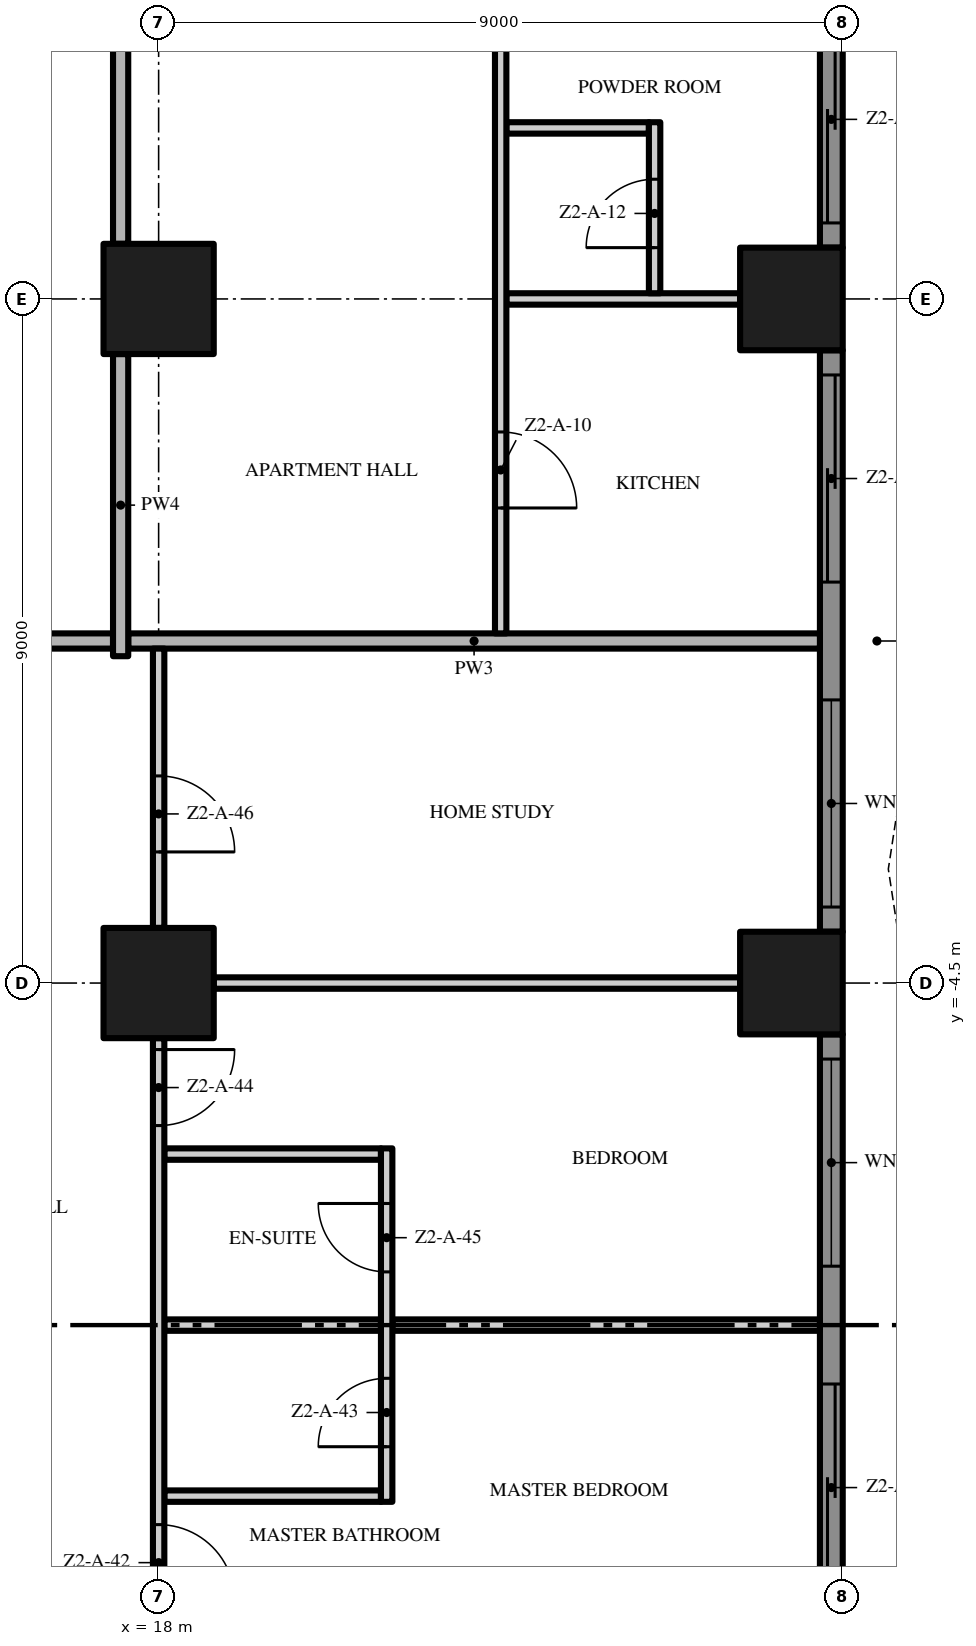
"""IFC4 building model, lengths in metres.
Left out: names, types, materials, properties, quantities, classifications, styles, units other than length and angle.
Written with IfcOpenShell. Run it as: python <this file> out.ifc"""

import sys

from ifc_helpers import new_model, si_unit, direction, frame, frame_2d, origin, origin_2d, place, context, subcontext, project, spatial, polyline, rectangle, outline, extrude, element, fill, save


model = new_model("IFC4")
c1 = context("Model", 3, precision=1e-05, world=origin(), true_north=direction((0.0, 1.0)))
c2 = subcontext(c1, "Body", "Model", "MODEL_VIEW")
j1 = project(units=[si_unit("LENGTHUNIT", "METRE"), si_unit("PLANEANGLEUNIT", "RADIAN")], contexts=[c1])
p1 = place(None, origin())
s1 = spatial("IfcSite", under=j1, at=p1, CompositionType="ELEMENT")
p2 = place(p1, origin())
s2 = spatial("IfcBuilding", under=s1, at=p2, CompositionType="ELEMENT")
p3 = place(p2, frame((0.0, 0.0, 69.4)))
s3 = spatial("IfcBuildingStorey", under=s2, at=p3, CompositionType="ELEMENT", Elevation=69.4)
for number, where, z_axis, x_axis in (
    (1, (18.0, -4.5, 0.0), (0.0, 0.0, 1.0), (1.0, 0.0, 0.0)),
    (2, (18.0, 4.5, 0.0), (0.0, 0.0, 1.0), (1.0, 0.0, 0.0)),
):
    element("IfcColumn", number, at=place(p3, frame(where, z_axis=z_axis, x_axis=x_axis)), inside=s3, PredefinedType="COLUMN", context=c2, shape_type="SweptSolid", body=[
        extrude(rectangle(XDim=1.45, YDim=1.45, at=origin_2d()), origin(), (0.0, 0.0, 1.0), 3.5),
    ])
for number, where, z_axis, x_axis in (
    (3, (26.325, -4.5, 0.0), (0.0, 0.0, 1.0), (1.0, 0.0, 0.0)),
    (4, (26.325, 4.5, 0.0), (0.0, 0.0, 1.0), (1.0, 0.0, 0.0)),
):
    element("IfcColumn", number, at=place(p3, frame(where, z_axis=z_axis, x_axis=x_axis)), inside=s3, PredefinedType="COLUMN", context=c2, shape_type="SweptSolid", body=[
        extrude(rectangle(XDim=1.35, YDim=1.35, at=origin_2d()), origin(), (0.0, 0.0, 1.0), 3.5),
    ])
p4 = place(p3, frame((26.85, -5.175, 0.0), z_axis=(0.0, 0.0, 1.0), x_axis=(0.0, -1.0, 0.0)))
e5 = element("IfcWall", 5, at=p4, inside=s3, PredefinedType="SOLIDWALL", context=c2, shape_type="SweptSolid", body=[
    extrude(rectangle(XDim=7.65, YDim=0.3, at=frame_2d((3.825, 0.0))), origin(), (0.0, 0.0, 1.0), 3.5),
])
p5 = place(p4, frame((4.6, 0.0, 0.0)))
e6 = element("IfcOpeningElement", 6, at=p5, cuts=e5, PredefinedType="OPENING", context=c2, shape_type="SweptSolid", body=[
    extrude(rectangle(XDim=2.725, YDim=2.4, at=frame_2d((1.363, 1.2))), frame((0.0, 0.16, 0.0), z_axis=(0.0, -1.0, 0.0), x_axis=(1.0, 0.0, 0.0)), (0.0, 0.0, 1.0), 0.32),
])
p6 = place(p4, frame((0.325, 0.0, 0.45)))
e7 = element("IfcOpeningElement", 7, at=p6, cuts=e5, PredefinedType="OPENING", context=c2, shape_type="SweptSolid", body=[
    extrude(rectangle(XDim=2.725, YDim=2.65, at=frame_2d((1.363, 1.325))), frame((0.0, 0.16, 0.0), z_axis=(0.0, -1.0, 0.0), x_axis=(1.0, 0.0, 0.0)), (0.0, 0.0, 1.0), 0.32),
])
p7 = place(p3, frame((26.85, 3.825, 0.0), z_axis=(0.0, 0.0, 1.0), x_axis=(0.0, -1.0, 0.0)))
e8 = element("IfcWall", 8, at=p7, inside=s3, PredefinedType="SOLIDWALL", context=c2, shape_type="SweptSolid", body=[
    extrude(rectangle(XDim=7.65, YDim=0.3, at=frame_2d((3.825, 0.0))), origin(), (0.0, 0.0, 1.0), 3.5),
])
p8 = place(p7, frame((4.6, 0.0, 0.45)))
e9 = element("IfcOpeningElement", 9, at=p8, cuts=e8, PredefinedType="OPENING", context=c2, shape_type="SweptSolid", body=[
    extrude(rectangle(XDim=2.725, YDim=2.65, at=frame_2d((1.363, 1.325))), frame((0.0, 0.16, 0.0), z_axis=(0.0, -1.0, 0.0), x_axis=(1.0, 0.0, 0.0)), (0.0, 0.0, 1.0), 0.32),
])
p9 = place(p7, frame((0.325, 0.0, 0.0)))
e10 = element("IfcOpeningElement", 10, at=p9, cuts=e8, PredefinedType="OPENING", context=c2, shape_type="SweptSolid", body=[
    extrude(rectangle(XDim=2.725, YDim=2.4, at=frame_2d((1.363, 1.2))), frame((0.0, 0.16, 0.0), z_axis=(0.0, -1.0, 0.0), x_axis=(1.0, 0.0, 0.0)), (0.0, 0.0, 1.0), 0.32),
])
p10 = place(p3, frame((26.85, 12.825, 0.0), z_axis=(0.0, 0.0, 1.0), x_axis=(0.0, -1.0, 0.0)))
e11 = element("IfcWall", 11, at=p10, inside=s3, PredefinedType="SOLIDWALL", context=c2, shape_type="SweptSolid", body=[
    extrude(rectangle(XDim=7.65, YDim=0.3, at=frame_2d((3.825, 0.0))), origin(), (0.0, 0.0, 1.0), 3.5),
])
p11 = place(p10, frame((4.6, 0.0, 0.0)))
e12 = element("IfcOpeningElement", 12, at=p11, cuts=e11, PredefinedType="OPENING", context=c2, shape_type="SweptSolid", body=[
    extrude(rectangle(XDim=2.725, YDim=2.4, at=frame_2d((1.363, 1.2))), frame((0.0, 0.16, 0.0), z_axis=(0.0, -1.0, 0.0), x_axis=(1.0, 0.0, 0.0)), (0.0, 0.0, 1.0), 0.32),
])
p12 = place(p10, frame((0.325, 0.0, 0.45)))
e13 = element("IfcOpeningElement", 13, at=p12, cuts=e11, PredefinedType="OPENING", context=c2, shape_type="SweptSolid", body=[
    extrude(rectangle(XDim=2.725, YDim=2.65, at=frame_2d((1.363, 1.325))), frame((0.0, 0.16, 0.0), z_axis=(0.0, -1.0, 0.0), x_axis=(1.0, 0.0, 0.0)), (0.0, 0.0, 1.0), 0.32),
])
p13 = place(p3, origin())
e14 = element("IfcWall", 14, at=p13, inside=s3, PredefinedType="USERDEFINED", context=c2, shape_type="SweptSolid", body=[
    extrude(outline(polyline([(27.6, -18.0), (27.829, -16.5), (28.429, -15.0), (29.171, -13.5), (29.771, -12.0), (30.0, -10.5), (29.771, -9.0), (29.171, -7.5), (28.429, -6.0), (27.829, -4.5), (27.6, -3.0), (27.829, -1.5), (28.429, 0.0), (29.171, 1.5), (29.771, 3.0), (30.0, 4.5), (29.771, 6.0), (29.171, 7.5), (28.429, 9.0), (27.829, 10.5), (27.6, 12.0), (27.829, 13.5), (28.429, 15.0), (29.171, 16.5), (29.771, 18.0), (29.539, 18.093), (28.942, 16.602), (28.201, 15.102), (27.586, 13.566), (27.347, 12.0), (27.586, 10.434), (28.201, 8.898), (28.942, 7.398), (29.528, 5.934), (29.747, 4.5), (29.528, 3.066), (28.942, 1.602), (28.201, 0.102), (27.586, -1.434), (27.347, -3.0), (27.586, -4.566), (28.201, -6.102), (28.942, -7.602), (29.528, -9.066), (29.747, -10.5), (29.528, -11.934), (28.942, -13.398), (28.201, -14.898), (27.586, -16.434), (27.353, -17.962), (27.6, -18.0)])), origin(), (0.0, 0.0, 1.0), 0.9),
])
for number, where, z_axis, x_axis in (
    (15, (18.075, -11.25, 0.0), (0.0, 0.0, 1.0), (1.0, 0.0, 0.0)),
    (16, (18.075, -9.0, 0.0), (0.0, 0.0, 1.0), (1.0, 0.0, 0.0)),
):
    element("IfcWall", number, at=place(p3, frame(where, z_axis=z_axis, x_axis=x_axis)), inside=s3, PredefinedType="PARTITIONING", context=c2, shape_type="SweptSolid", body=[
        extrude(rectangle(XDim=2.85, YDim=0.15, at=frame_2d((1.425, 0.0))), origin(), (0.0, 0.0, 1.0), 3.5),
    ])
p14 = place(p3, frame((21.075, -9.0, 0.0), z_axis=(0.0, 0.0, 1.0), x_axis=(1.0, 0.0, 0.0)))
e17 = element("IfcWall", 17, at=p14, inside=s3, PredefinedType="PARTITIONING", context=c2, shape_type="SweptSolid", body=[
    extrude(rectangle(XDim=5.625, YDim=0.15, at=frame_2d((2.812, 0.0))), origin(), (0.0, 0.0, 1.0), 3.5),
])
p15 = place(p3, frame((18.075, -6.75, 0.0), z_axis=(0.0, 0.0, 1.0), x_axis=(1.0, 0.0, 0.0)))
e18 = element("IfcWall", 18, at=p15, inside=s3, PredefinedType="PARTITIONING", context=c2, shape_type="SweptSolid", body=[
    extrude(rectangle(XDim=2.85, YDim=0.15, at=frame_2d((1.425, 0.0))), origin(), (0.0, 0.0, 1.0), 3.5),
])
p16 = place(p3, frame((18.725, -4.5, 0.0), z_axis=(0.0, 0.0, 1.0), x_axis=(1.0, 0.0, 0.0)))
e19 = element("IfcWall", 19, at=p16, inside=s3, PredefinedType="PARTITIONING", context=c2, shape_type="SweptSolid", body=[
    extrude(rectangle(XDim=6.925, YDim=0.15, at=frame_2d((3.462, 0.0))), origin(), (0.0, 0.0, 1.0), 3.5),
])
p17 = place(p3, frame((4.6, 0.0, 0.0), z_axis=(0.0, 0.0, 1.0), x_axis=(1.0, 0.0, 0.0)))
e20 = element("IfcWall", 20, at=p17, inside=s3, PredefinedType="PARTITIONING", context=c2, shape_type="SweptSolid", body=[
    extrude(rectangle(XDim=12.8, YDim=0.2, at=frame_2d((6.4, 0.0))), origin(), (0.0, 0.0, 1.0), 3.5),
])
p18 = place(p3, frame((17.6, 0.0, 0.0), z_axis=(0.0, 0.0, 1.0), x_axis=(1.0, 0.0, 0.0)))
e21 = element("IfcWall", 21, at=p18, inside=s3, PredefinedType="PARTITIONING", context=c2, shape_type="SweptSolid", body=[
    extrude(rectangle(XDim=9.1, YDim=0.2, at=frame_2d((4.55, 0.0))), origin(), (0.0, 0.0, 1.0), 3.5),
])
p19 = place(p3, frame((22.575, 4.5, 0.0), z_axis=(0.0, 0.0, 1.0), x_axis=(1.0, 0.0, 0.0)))
e22 = element("IfcWall", 22, at=p19, inside=s3, PredefinedType="PARTITIONING", context=c2, shape_type="SweptSolid", body=[
    extrude(rectangle(XDim=3.075, YDim=0.15, at=frame_2d((1.538, 0.0))), origin(), (0.0, 0.0, 1.0), 3.5),
])
p20 = place(p3, frame((22.575, 6.75, 0.0), z_axis=(0.0, 0.0, 1.0), x_axis=(1.0, 0.0, 0.0)))
e23 = element("IfcWall", 23, at=p20, inside=s3, PredefinedType="PARTITIONING", context=c2, shape_type="SweptSolid", body=[
    extrude(rectangle(XDim=1.875, YDim=0.15, at=frame_2d((0.938, 0.0))), origin(), (0.0, 0.0, 1.0), 3.5),
])
p21 = place(p3, frame((17.5, -0.2, 0.0), z_axis=(0.0, 0.0, 1.0), x_axis=(0.0, 1.0, 0.0)))
e24 = element("IfcWall", 24, at=p21, inside=s3, PredefinedType="PARTITIONING", context=c2, shape_type="SweptSolid", body=[
    extrude(rectangle(XDim=3.975, YDim=0.2, at=frame_2d((1.988, 0.0))), origin(), (0.0, 0.0, 1.0), 3.5),
])
p22 = place(p3, frame((17.5, 12.775, 0.0), z_axis=(0.0, 0.0, 1.0), x_axis=(0.0, -1.0, 0.0)))
e25 = element("IfcWall", 25, at=p22, inside=s3, PredefinedType="PARTITIONING", context=c2, shape_type="SweptSolid", body=[
    extrude(rectangle(XDim=7.55, YDim=0.2, at=frame_2d((3.775, 0.0))), origin(), (0.0, 0.0, 1.0), 3.5),
])
p23 = place(p22, frame((3.175, 0.0, 0.0)))
e26 = element("IfcOpeningElement", 26, at=p23, cuts=e25, PredefinedType="OPENING", context=c2, shape_type="SweptSolid", body=[
    extrude(rectangle(XDim=1.2, YDim=2.4, at=frame_2d((0.6, 1.2))), frame((0.0, 0.11, 0.0), z_axis=(0.0, -1.0, 0.0), x_axis=(1.0, 0.0, 0.0)), (0.0, 0.0, 1.0), 0.22),
])
p24 = place(p3, frame((18.0, -5.225, 0.0), z_axis=(0.0, 0.0, 1.0), x_axis=(0.0, -1.0, 0.0)))
e27 = element("IfcWall", 27, at=p24, inside=s3, PredefinedType="PARTITIONING", context=c2, shape_type="SweptSolid", body=[
    extrude(rectangle(XDim=7.55, YDim=0.15, at=frame_2d((3.775, 0.0))), origin(), (0.0, 0.0, 1.0), 3.5),
])
p25 = place(p24, frame((6.4, 0.0, 0.0)))
e28 = element("IfcOpeningElement", 28, at=p25, cuts=e27, PredefinedType="OPENING", context=c2, shape_type="SweptSolid", body=[
    extrude(rectangle(XDim=1.0, YDim=2.4, at=frame_2d((0.5, 1.2))), frame((0.0, 0.085, 0.0), z_axis=(0.0, -1.0, 0.0), x_axis=(1.0, 0.0, 0.0)), (0.0, 0.0, 1.0), 0.17),
])
p26 = place(p24, frame((0.15, 0.0, 0.0)))
e29 = element("IfcOpeningElement", 29, at=p26, cuts=e27, PredefinedType="OPENING", context=c2, shape_type="SweptSolid", body=[
    extrude(rectangle(XDim=1.0, YDim=2.4, at=frame_2d((0.5, 1.2))), frame((0.0, 0.085, 0.0), z_axis=(0.0, -1.0, 0.0), x_axis=(1.0, 0.0, 0.0)), (0.0, 0.0, 1.0), 0.17),
])
p27 = place(p3, frame((18.0, -0.1, 0.0), z_axis=(0.0, 0.0, 1.0), x_axis=(0.0, -1.0, 0.0)))
e30 = element("IfcWall", 30, at=p27, inside=s3, PredefinedType="PARTITIONING", context=c2, shape_type="SweptSolid", body=[
    extrude(rectangle(XDim=3.675, YDim=0.15, at=frame_2d((1.837, 0.0))), origin(), (0.0, 0.0, 1.0), 3.5),
])
p28 = place(p27, frame((1.675, 0.0, 0.0)))
e31 = element("IfcOpeningElement", 31, at=p28, cuts=e30, PredefinedType="OPENING", context=c2, shape_type="SweptSolid", body=[
    extrude(rectangle(XDim=1.0, YDim=2.4, at=frame_2d((0.5, 1.2))), frame((0.0, 0.085, 0.0), z_axis=(0.0, -1.0, 0.0), x_axis=(1.0, 0.0, 0.0)), (0.0, 0.0, 1.0), 0.17),
])
p29 = place(p3, frame((21.0, -11.325, 0.0), z_axis=(0.0, 0.0, 1.0), x_axis=(0.0, 1.0, 0.0)))
e32 = element("IfcWall", 32, at=p29, inside=s3, PredefinedType="PARTITIONING", context=c2, shape_type="SweptSolid", body=[
    extrude(rectangle(XDim=4.65, YDim=0.15, at=frame_2d((2.325, 0.0))), origin(), (0.0, 0.0, 1.0), 3.5),
])
p30 = place(p29, frame((0.725, 0.0, 0.0)))
e33 = element("IfcOpeningElement", 33, at=p30, cuts=e32, PredefinedType="OPENING", context=c2, shape_type="SweptSolid", body=[
    extrude(rectangle(XDim=0.9, YDim=2.1, at=frame_2d((0.45, 1.05))), frame((0.0, 0.085, 0.0), z_axis=(0.0, -1.0, 0.0), x_axis=(1.0, 0.0, 0.0)), (0.0, 0.0, 1.0), 0.17),
])
p31 = place(p29, frame((3.025, 0.0, 0.0)))
e34 = element("IfcOpeningElement", 34, at=p31, cuts=e32, PredefinedType="OPENING", context=c2, shape_type="SweptSolid", body=[
    extrude(rectangle(XDim=0.9, YDim=2.1, at=frame_2d((0.45, 1.05))), frame((0.0, 0.085, 0.0), z_axis=(0.0, -1.0, 0.0), x_axis=(1.0, 0.0, 0.0)), (0.0, 0.0, 1.0), 0.17),
])
p32 = place(p3, frame((22.5, 17.325, 0.0), z_axis=(0.0, 0.0, 1.0), x_axis=(0.0, -1.0, 0.0)))
e35 = element("IfcWall", 35, at=p32, inside=s3, PredefinedType="PARTITIONING", context=c2, shape_type="SweptSolid", body=[
    extrude(rectangle(XDim=17.225, YDim=0.15, at=frame_2d((8.613, 0.0))), origin(), (0.0, 0.0, 1.0), 3.5),
])
p33 = place(p32, frame((14.575, 0.0, 0.0)))
e36 = element("IfcOpeningElement", 36, at=p33, cuts=e35, PredefinedType="OPENING", context=c2, shape_type="SweptSolid", body=[
    extrude(rectangle(XDim=1.0, YDim=2.4, at=frame_2d((0.5, 1.2))), frame((0.0, 0.085, 0.0), z_axis=(0.0, -1.0, 0.0), x_axis=(1.0, 0.0, 0.0)), (0.0, 0.0, 1.0), 0.17),
])
p34 = place(p32, frame((7.425, 0.0, 0.0)))
e37 = element("IfcOpeningElement", 37, at=p34, cuts=e35, PredefinedType="OPENING", context=c2, shape_type="SweptSolid", body=[
    extrude(rectangle(XDim=1.8, YDim=2.4, at=frame_2d((0.9, 1.2))), frame((0.0, 0.085, 0.0), z_axis=(0.0, -1.0, 0.0), x_axis=(1.0, 0.0, 0.0)), (0.0, 0.0, 1.0), 0.17),
])
p35 = place(p32, frame((0.15, 0.0, 0.0)))
e38 = element("IfcOpeningElement", 38, at=p35, cuts=e35, PredefinedType="OPENING", context=c2, shape_type="SweptSolid", body=[
    extrude(rectangle(XDim=1.0, YDim=2.4, at=frame_2d((0.5, 1.2))), frame((0.0, 0.085, 0.0), z_axis=(0.0, -1.0, 0.0), x_axis=(1.0, 0.0, 0.0)), (0.0, 0.0, 1.0), 0.17),
])
p36 = place(p3, frame((24.525, 4.575, 0.0), z_axis=(0.0, 0.0, 1.0), x_axis=(0.0, 1.0, 0.0)))
e39 = element("IfcWall", 39, at=p36, inside=s3, PredefinedType="PARTITIONING", context=c2, shape_type="SweptSolid", body=[
    extrude(rectangle(XDim=2.25, YDim=0.15, at=frame_2d((1.125, 0.0))), origin(), (0.0, 0.0, 1.0), 3.5),
])
p37 = place(p36, frame((0.6, 0.0, 0.0)))
e40 = element("IfcOpeningElement", 40, at=p37, cuts=e39, PredefinedType="OPENING", context=c2, shape_type="SweptSolid", body=[
    extrude(rectangle(XDim=0.9, YDim=2.1, at=frame_2d((0.45, 1.05))), frame((0.0, 0.085, 0.0), z_axis=(0.0, -1.0, 0.0), x_axis=(1.0, 0.0, 0.0)), (0.0, 0.0, 1.0), 0.17),
])
p38 = place(p5, origin())
e41 = element("IfcDoor", 41, at=p38, inside=s3, OperationType="SINGLE_SWING_LEFT", PredefinedType="DOOR", context=c2, shape_type="SweptSolid", body=[
    extrude(rectangle(XDim=2.725, YDim=2.4, at=frame_2d((1.363, 1.2))), frame((0.0, 0.025, 0.0), z_axis=(0.0, -1.0, 0.0), x_axis=(1.0, 0.0, 0.0)), (0.0, 0.0, 1.0), 0.05),
])
fill(e6, e41)
p39 = place(p6, origin())
e42 = element("IfcWindow", 42, at=p39, inside=s3, PartitioningType="SINGLE_PANEL", PredefinedType="WINDOW", context=c2, shape_type="SweptSolid", body=[
    extrude(rectangle(XDim=2.725, YDim=2.65, at=frame_2d((1.363, 1.325))), frame((0.0, 0.03, 0.0), z_axis=(0.0, -1.0, 0.0), x_axis=(1.0, 0.0, 0.0)), (0.0, 0.0, 1.0), 0.06),
])
fill(e7, e42)
p40 = place(p8, origin())
e43 = element("IfcWindow", 43, at=p40, inside=s3, PartitioningType="SINGLE_PANEL", PredefinedType="WINDOW", context=c2, shape_type="SweptSolid", body=[
    extrude(rectangle(XDim=2.725, YDim=2.65, at=frame_2d((1.363, 1.325))), frame((0.0, 0.03, 0.0), z_axis=(0.0, -1.0, 0.0), x_axis=(1.0, 0.0, 0.0)), (0.0, 0.0, 1.0), 0.06),
])
fill(e9, e43)
p41 = place(p9, origin())
e44 = element("IfcDoor", 44, at=p41, inside=s3, OperationType="SINGLE_SWING_LEFT", PredefinedType="DOOR", context=c2, shape_type="SweptSolid", body=[
    extrude(rectangle(XDim=2.725, YDim=2.4, at=frame_2d((1.363, 1.2))), frame((0.0, 0.025, 0.0), z_axis=(0.0, -1.0, 0.0), x_axis=(1.0, 0.0, 0.0)), (0.0, 0.0, 1.0), 0.05),
])
fill(e10, e44)
p42 = place(p11, origin())
e45 = element("IfcDoor", 45, at=p42, inside=s3, OperationType="SINGLE_SWING_LEFT", PredefinedType="DOOR", context=c2, shape_type="SweptSolid", body=[
    extrude(rectangle(XDim=2.725, YDim=2.4, at=frame_2d((1.363, 1.2))), frame((0.0, 0.025, 0.0), z_axis=(0.0, -1.0, 0.0), x_axis=(1.0, 0.0, 0.0)), (0.0, 0.0, 1.0), 0.05),
])
fill(e12, e45)
p43 = place(p33, origin())
e46 = element("IfcDoor", 46, at=p43, inside=s3, OperationType="SINGLE_SWING_RIGHT", PredefinedType="DOOR", context=c2, shape_type="SweptSolid", body=[
    extrude(rectangle(XDim=1.0, YDim=2.4, at=frame_2d((0.5, 1.2))), frame((0.0, 0.025, 0.0), z_axis=(0.0, -1.0, 0.0), x_axis=(1.0, 0.0, 0.0)), (0.0, 0.0, 1.0), 0.05),
])
fill(e36, e46)
p44 = place(p37, origin())
e47 = element("IfcDoor", 47, at=p44, inside=s3, OperationType="SINGLE_SWING_LEFT", PredefinedType="DOOR", context=c2, shape_type="SweptSolid", body=[
    extrude(rectangle(XDim=0.9, YDim=2.1, at=frame_2d((0.45, 1.05))), frame((0.0, 0.025, 0.0), z_axis=(0.0, -1.0, 0.0), x_axis=(1.0, 0.0, 0.0)), (0.0, 0.0, 1.0), 0.05),
])
fill(e40, e47)
p45 = place(p25, origin())
e48 = element("IfcDoor", 48, at=p45, inside=s3, OperationType="SINGLE_SWING_RIGHT", PredefinedType="DOOR", context=c2, shape_type="SweptSolid", body=[
    extrude(rectangle(XDim=1.0, YDim=2.4, at=frame_2d((0.5, 1.2))), frame((0.0, 0.025, 0.0), z_axis=(0.0, -1.0, 0.0), x_axis=(1.0, 0.0, 0.0)), (0.0, 0.0, 1.0), 0.05),
])
fill(e28, e48)
p46 = place(p30, origin())
e49 = element("IfcDoor", 49, at=p46, inside=s3, OperationType="SINGLE_SWING_LEFT", PredefinedType="DOOR", context=c2, shape_type="SweptSolid", body=[
    extrude(rectangle(XDim=0.9, YDim=2.1, at=frame_2d((0.45, 1.05))), frame((0.0, 0.025, 0.0), z_axis=(0.0, -1.0, 0.0), x_axis=(1.0, 0.0, 0.0)), (0.0, 0.0, 1.0), 0.05),
])
fill(e33, e49)
p47 = place(p26, origin())
e50 = element("IfcDoor", 50, at=p47, inside=s3, OperationType="SINGLE_SWING_LEFT", PredefinedType="DOOR", context=c2, shape_type="SweptSolid", body=[
    extrude(rectangle(XDim=1.0, YDim=2.4, at=frame_2d((0.5, 1.2))), frame((0.0, 0.025, 0.0), z_axis=(0.0, -1.0, 0.0), x_axis=(1.0, 0.0, 0.0)), (0.0, 0.0, 1.0), 0.05),
])
fill(e29, e50)
p48 = place(p31, origin())
e51 = element("IfcDoor", 51, at=p48, inside=s3, OperationType="SINGLE_SWING_RIGHT", PredefinedType="DOOR", context=c2, shape_type="SweptSolid", body=[
    extrude(rectangle(XDim=0.9, YDim=2.1, at=frame_2d((0.45, 1.05))), frame((0.0, 0.025, 0.0), z_axis=(0.0, -1.0, 0.0), x_axis=(1.0, 0.0, 0.0)), (0.0, 0.0, 1.0), 0.05),
])
fill(e34, e51)
p49 = place(p28, origin())
e52 = element("IfcDoor", 52, at=p49, inside=s3, OperationType="SINGLE_SWING_RIGHT", PredefinedType="DOOR", context=c2, shape_type="SweptSolid", body=[
    extrude(rectangle(XDim=1.0, YDim=2.4, at=frame_2d((0.5, 1.2))), frame((0.0, 0.025, 0.0), z_axis=(0.0, -1.0, 0.0), x_axis=(1.0, 0.0, 0.0)), (0.0, 0.0, 1.0), 0.05),
])
fill(e31, e52)
save(model, sys.argv[1])
